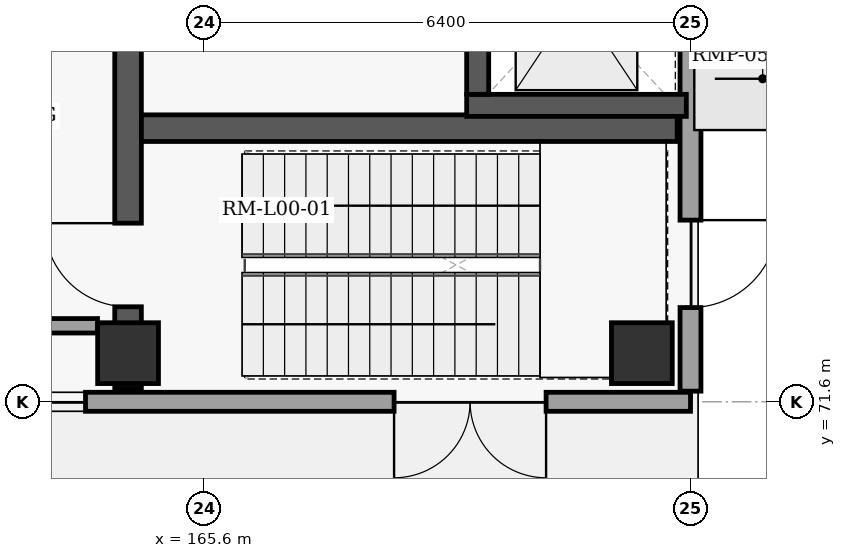
"""IFC4 building model, lengths in metres.
Left out: names, types, materials, properties, quantities, classifications, styles, units other than length and angle.
Written with IfcOpenShell. Run it as: python <this file> out.ifc"""

import sys

from ifc_helpers import new_model, si_unit, direction, frame, frame_2d, origin, origin_2d, place, context, subcontext, project, spatial, rectangle, extrude, element, fill, save


model = new_model("IFC4")
c1 = context("Model", 3, precision=1e-05, world=origin(), true_north=direction((0.0, 1.0)))
c2 = subcontext(c1, "Body", "Model", "MODEL_VIEW")
j1 = project(units=[si_unit("LENGTHUNIT", "METRE"), si_unit("PLANEANGLEUNIT", "RADIAN")], contexts=[c1])
p1 = place(None, origin())
s1 = spatial("IfcSite", under=j1, at=p1, CompositionType="ELEMENT")
p2 = place(p1, origin())
s2 = spatial("IfcBuilding", under=s1, at=p2, CompositionType="ELEMENT")
p3 = place(p2, origin())
s3 = spatial("IfcBuildingStorey", under=s2, at=p3, CompositionType="ELEMENT", Elevation=0.0)
for number, where, z_axis, x_axis in (
    (1, (164.6, 72.24, 0.0), (0.0, 0.0, 1.0), (1.0, 0.0, 0.0)),
    (2, (171.36, 72.24, 0.0), (0.0, 0.0, 1.0), (1.0, 0.0, 0.0)),
):
    element("IfcColumn", number, at=place(p3, frame(where, z_axis=z_axis, x_axis=x_axis)), inside=s3, PredefinedType="COLUMN", context=c2, shape_type="SweptSolid", body=[
        extrude(rectangle(XDim=0.8, YDim=0.8, at=origin_2d()), origin(), (0.0, 0.0, 1.0), 5.4),
    ])
p4 = place(p3, frame((172.0, 117.86, 0.0), z_axis=(0.0, 0.0, 1.0), x_axis=(0.0, -1.0, 0.0)))
e3 = element("IfcWall", 3, at=p4, inside=s3, PredefinedType="SOLIDWALL", context=c2, shape_type="SweptSolid", body=[
    extrude(rectangle(XDim=46.12, YDim=0.275, at=frame_2d((23.06, 0.0))), origin(), (0.0, 0.0, 1.0), 5.14),
])
p5 = place(p4, frame((43.87, 0.0, 0.0)))
e4 = element("IfcOpeningElement", 4, at=p5, cuts=e3, PredefinedType="OPENING", context=c2, shape_type="SweptSolid", body=[
    extrude(rectangle(XDim=1.15, YDim=2.2, at=frame_2d((0.575, 1.1))), frame((0.0, 0.147, 0.0), z_axis=(0.0, -1.0, 0.0), x_axis=(1.0, 0.0, 0.0)), (0.0, 0.0, 1.0), 0.295),
])
p6 = place(p4, frame((1.1, 0.0, 0.0)))
e5 = element("IfcOpeningElement", 5, at=p6, cuts=e3, PredefinedType="OPENING", context=c2, shape_type="SweptSolid", body=[
    extrude(rectangle(XDim=1.15, YDim=2.2, at=frame_2d((0.575, 1.1))), frame((0.0, 0.147, 0.0), z_axis=(0.0, -1.0, 0.0), x_axis=(1.0, 0.0, 0.0)), (0.0, 0.0, 1.0), 0.295),
])
p7 = place(p3, frame((172.0, 71.6, 0.0), z_axis=(0.0, 0.0, 1.0), x_axis=(-1.0, 0.0, 0.0)))
e6 = element("IfcWall", 6, at=p7, inside=s3, PredefinedType="SOLIDWALL", context=c2, shape_type="SweptSolid", body=[
    extrude(rectangle(XDim=32.4, YDim=0.25, at=frame_2d((16.2, 0.0))), origin(), (0.0, 0.0, 1.0), 4.45),
])
p8 = place(p7, frame((1.9, 0.0, 0.0)))
e7 = element("IfcOpeningElement", 7, at=p8, cuts=e6, PredefinedType="OPENING", context=c2, shape_type="SweptSolid", body=[
    extrude(rectangle(XDim=2.0, YDim=2.5, at=frame_2d((1.0, 1.25))), frame((0.0, 0.135, 0.0), z_axis=(0.0, -1.0, 0.0), x_axis=(1.0, 0.0, 0.0)), (0.0, 0.0, 1.0), 0.27),
])
p9 = place(p7, frame((7.96, 0.0, 0.8)))
e8 = element("IfcOpeningElement", 8, at=p9, cuts=e6, PredefinedType="OPENING", context=c2, shape_type="SweptSolid", body=[
    extrude(rectangle(XDim=3.35, YDim=2.9, at=frame_2d((1.675, 1.45))), frame((0.0, 0.135, 0.0), z_axis=(0.0, -1.0, 0.0), x_axis=(1.0, 0.0, 0.0)), (0.0, 0.0, 1.0), 0.27),
])
p10 = place(p7, frame((15.17, 0.0, 0.8)))
e9 = element("IfcOpeningElement", 9, at=p10, cuts=e6, PredefinedType="OPENING", context=c2, shape_type="SweptSolid", body=[
    extrude(rectangle(XDim=3.65, YDim=2.9, at=frame_2d((1.825, 1.45))), frame((0.0, 0.135, 0.0), z_axis=(0.0, -1.0, 0.0), x_axis=(1.0, 0.0, 0.0)), (0.0, 0.0, 1.0), 0.27),
])
p11 = place(p7, frame((19.48, 0.0, 0.8)))
e10 = element("IfcOpeningElement", 10, at=p11, cuts=e6, PredefinedType="OPENING", context=c2, shape_type="SweptSolid", body=[
    extrude(rectangle(XDim=1.4, YDim=2.1, at=frame_2d((0.7, 1.05))), frame((0.0, 0.135, 0.0), z_axis=(0.0, -1.0, 0.0), x_axis=(1.0, 0.0, 0.0)), (0.0, 0.0, 1.0), 0.27),
])
p12 = place(p7, frame((25.24, 0.0, 0.8)))
e11 = element("IfcOpeningElement", 11, at=p12, cuts=e6, PredefinedType="OPENING", context=c2, shape_type="SweptSolid", body=[
    extrude(rectangle(XDim=1.5, YDim=2.1, at=frame_2d((0.75, 1.05))), frame((0.0, 0.135, 0.0), z_axis=(0.0, -1.0, 0.0), x_axis=(1.0, 0.0, 0.0)), (0.0, 0.0, 1.0), 0.27),
])
p13 = place(p3, frame((164.6, 71.775, 0.0), z_axis=(0.0, 0.0, 1.0), x_axis=(0.0, 1.0, 0.0)))
e12 = element("IfcWall", 12, at=p13, inside=s3, PredefinedType="SHEAR", context=c2, shape_type="SweptSolid", body=[
    extrude(rectangle(XDim=7.423, YDim=0.35, at=frame_2d((3.711, 0.0))), origin(), (0.0, 0.0, 1.0), 5.14),
])
p14 = place(p13, frame((1.075, 0.0, 0.0)))
e13 = element("IfcOpeningElement", 13, at=p14, cuts=e12, PredefinedType="OPENING", context=c2, shape_type="SweptSolid", body=[
    extrude(rectangle(XDim=1.1, YDim=2.15, at=frame_2d((0.55, 1.075))), frame((0.0, 0.185, 0.0), z_axis=(0.0, -1.0, 0.0), x_axis=(1.0, 0.0, 0.0)), (0.0, 0.0, 1.0), 0.37),
])
p15 = place(p13, frame((5.05, 0.0, 0.0)))
e14 = element("IfcOpeningElement", 14, at=p15, cuts=e12, PredefinedType="OPENING", context=c2, shape_type="SweptSolid", body=[
    extrude(rectangle(XDim=1.15, YDim=2.2, at=frame_2d((0.575, 1.1))), frame((0.0, 0.185, 0.0), z_axis=(0.0, -1.0, 0.0), x_axis=(1.0, 0.0, 0.0)), (0.0, 0.0, 1.0), 0.37),
])
p16 = place(p3, frame((164.775, 75.2, 0.0), z_axis=(0.0, 0.0, 1.0), x_axis=(1.0, 0.0, 0.0)))
e15 = element("IfcWall", 15, at=p16, inside=s3, PredefinedType="SHEAR", context=c2, shape_type="SweptSolid", body=[
    extrude(rectangle(XDim=7.05, YDim=0.35, at=frame_2d((3.525, 0.0))), origin(), (0.0, 0.0, 1.0), 5.14),
])
p17 = place(p3, frame((169.055, 75.5, 0.0), z_axis=(0.0, 0.0, 1.0), x_axis=(1.0, 0.0, 0.0)))
e16 = element("IfcWall", 16, at=p17, inside=s3, PredefinedType="SHEAR", context=c2, shape_type="SweptSolid", body=[
    extrude(rectangle(XDim=2.89, YDim=0.29, at=frame_2d((1.445, 0.0))), origin(), (0.0, 0.0, 1.0), 5.14),
])
p18 = place(p3, frame((169.2, 75.645, 0.0), z_axis=(0.0, 0.0, 1.0), x_axis=(0.0, 1.0, 0.0)))
e17 = element("IfcWall", 17, at=p18, inside=s3, PredefinedType="SHEAR", context=c2, shape_type="SweptSolid", body=[
    extrude(rectangle(XDim=2.51, YDim=0.29, at=frame_2d((1.255, 0.0))), origin(), (0.0, 0.0, 1.0), 5.14),
])
p19 = place(p18, frame((0.705, 0.0, 0.0)))
e18 = element("IfcOpeningElement", 18, at=p19, cuts=e17, PredefinedType="OPENING", context=c2, shape_type="SweptSolid", body=[
    extrude(rectangle(XDim=1.1, YDim=2.15, at=frame_2d((0.55, 1.075))), frame((0.0, 0.155, 0.0), z_axis=(0.0, -1.0, 0.0), x_axis=(1.0, 0.0, 0.0)), (0.0, 0.0, 1.0), 0.31),
])
p20 = place(p3, frame((160.105, 72.6, 0.0), z_axis=(0.0, 0.0, 1.0), x_axis=(1.0, 0.0, 0.0)))
e19 = element("IfcWall", 19, at=p20, inside=s3, PredefinedType="PARTITIONING", context=c2, shape_type="SweptSolid", body=[
    extrude(rectangle(XDim=4.093, YDim=0.19, at=frame_2d((2.046, 0.0))), origin(), (0.0, 0.0, 1.0), 4.49),
])
p21 = place(p5, origin())
e20 = element("IfcDoor", 20, at=p21, inside=s3, OperationType="SINGLE_SWING_LEFT", PredefinedType="DOOR", context=c2, shape_type="SweptSolid", body=[
    extrude(rectangle(XDim=1.15, YDim=2.2, at=frame_2d((0.575, 1.1))), frame((0.0, 0.025, 0.0), z_axis=(0.0, -1.0, 0.0), x_axis=(1.0, 0.0, 0.0)), (0.0, 0.0, 1.0), 0.05),
])
fill(e4, e20)
p22 = place(p8, origin())
e21 = element("IfcDoor", 21, at=p22, inside=s3, OperationType="DOUBLE_SWING_LEFT", PredefinedType="DOOR", context=c2, shape_type="SweptSolid", body=[
    extrude(rectangle(XDim=2.0, YDim=2.5, at=frame_2d((1.0, 1.25))), frame((0.0, 0.025, 0.0), z_axis=(0.0, -1.0, 0.0), x_axis=(1.0, 0.0, 0.0)), (0.0, 0.0, 1.0), 0.05),
])
fill(e7, e21)
p23 = place(p9, origin())
e22 = element("IfcWindow", 22, at=p23, inside=s3, PartitioningType="SINGLE_PANEL", PredefinedType="WINDOW", context=c2, shape_type="SweptSolid", body=[
    extrude(rectangle(XDim=3.35, YDim=2.9, at=frame_2d((1.675, 1.45))), frame((0.0, 0.03, 0.0), z_axis=(0.0, -1.0, 0.0), x_axis=(1.0, 0.0, 0.0)), (0.0, 0.0, 1.0), 0.06),
])
fill(e8, e22)
p24 = place(p14, origin())
e23 = element("IfcDoor", 23, at=p24, inside=s3, OperationType="SINGLE_SWING_RIGHT", PredefinedType="DOOR", context=c2, shape_type="SweptSolid", body=[
    extrude(rectangle(XDim=1.1, YDim=2.15, at=frame_2d((0.55, 1.075))), frame((0.0, 0.025, 0.0), z_axis=(0.0, -1.0, 0.0), x_axis=(1.0, 0.0, 0.0)), (0.0, 0.0, 1.0), 0.05),
])
fill(e13, e23)
save(model, sys.argv[1])
